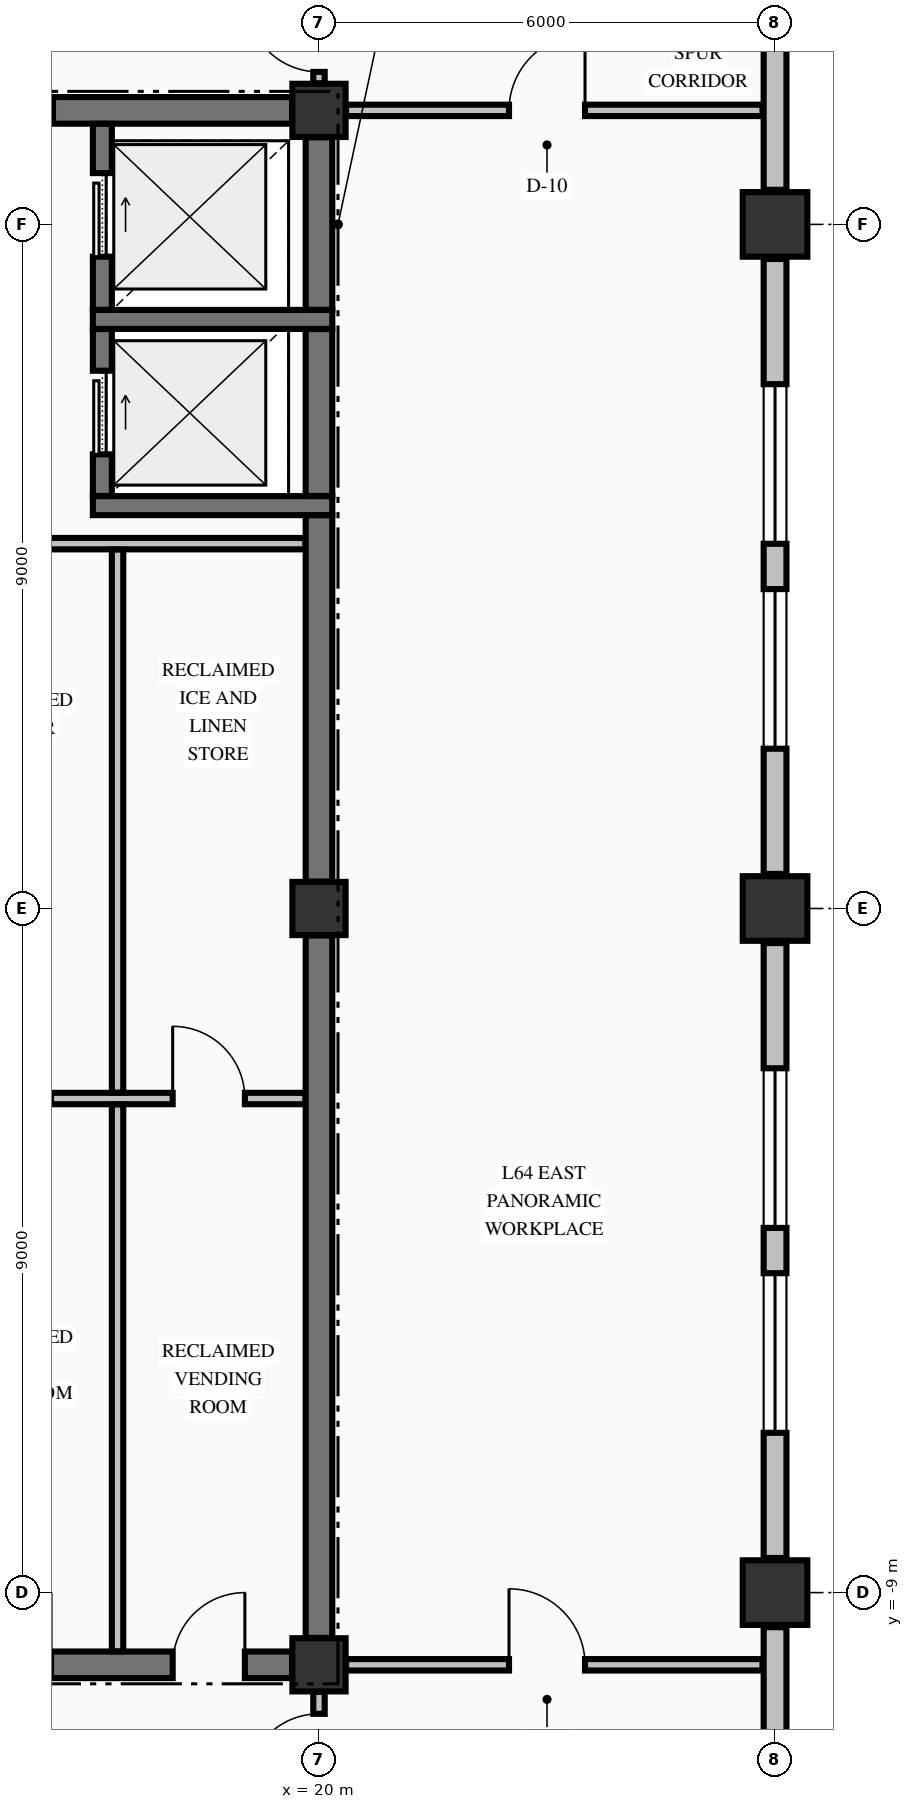
"""IFC4 building model, lengths in metres.
Left out: names, types, materials, properties, quantities, classifications, styles, units other than length and angle.
Written with IfcOpenShell. Run it as: python <this file> out.ifc"""

import sys

from ifc_helpers import new_model, si_unit, direction, frame, frame_2d, origin, origin_2d, place, context, subcontext, project, spatial, rectangle, extrude, element, fill, save


model = new_model("IFC4")
c1 = context("Model", 3, precision=1e-05, world=origin(), true_north=direction((0.0, 1.0)))
c2 = subcontext(c1, "Body", "Model", "MODEL_VIEW")
j1 = project(units=[si_unit("LENGTHUNIT", "METRE"), si_unit("PLANEANGLEUNIT", "RADIAN")], contexts=[c1])
p1 = place(None, origin())
s1 = spatial("IfcSite", under=j1, at=p1, CompositionType="ELEMENT")
p2 = place(p1, origin())
s2 = spatial("IfcBuilding", under=s1, at=p2, CompositionType="ELEMENT")
p3 = place(p2, frame((0.0, 0.0, 242.97)))
s3 = spatial("IfcBuildingStorey", under=s2, at=p3, CompositionType="ELEMENT", Elevation=242.97)
for number, where, z_axis, x_axis in (
    (1, (26.0, -9.0, -0.25), (0.0, 0.0, 1.0), (1.0, 0.0, 0.0)),
    (2, (26.0, 0.0, -0.25), (0.0, 0.0, 1.0), (1.0, 0.0, 0.0)),
    (3, (26.0, 9.0, -0.25), (0.0, 0.0, 1.0), (1.0, 0.0, 0.0)),
):
    element("IfcColumn", number, at=place(p3, frame(where, z_axis=z_axis, x_axis=x_axis)), inside=s3, PredefinedType="COLUMN", context=c2, shape_type="SweptSolid", body=[
        extrude(rectangle(XDim=0.85, YDim=0.85, at=origin_2d()), origin(), (0.0, 0.0, 1.0), 3.23),
    ])
for number, where, z_axis, x_axis in (
    (4, (20.0, -9.95, -0.25), (0.0, 0.0, 1.0), (1.0, 0.0, 0.0)),
    (5, (20.0, 10.5, -0.25), (0.0, 0.0, 1.0), (1.0, 0.0, 0.0)),
    (6, (20.0, 0.0, -0.25), (0.0, 0.0, 1.0), (1.0, 0.0, 0.0)),
):
    element("IfcColumn", number, at=place(p3, frame(where, z_axis=z_axis, x_axis=x_axis)), inside=s3, PredefinedType="COLUMN", context=c2, shape_type="SweptSolid", body=[
        extrude(rectangle(XDim=0.7, YDim=0.7, at=origin_2d()), origin(), (0.0, 0.0, 1.0), 3.23),
    ])
p4 = place(p3, frame((26.0, -17.545, 0.0), z_axis=(0.0, 0.0, 1.0), x_axis=(0.0, 1.0, 0.0)))
e7 = element("IfcWall", 7, at=p4, inside=s3, PredefinedType="STANDARD", context=c2, shape_type="SweptSolid", body=[
    extrude(rectangle(XDim=8.09, YDim=0.3, at=frame_2d((4.045, 0.0))), origin(), (0.0, 0.0, 1.0), 2.372),
])
p5 = place(p3, frame((26.0, -8.545, 0.0), z_axis=(0.0, 0.0, 1.0), x_axis=(0.0, 1.0, 0.0)))
e8 = element("IfcWall", 8, at=p5, inside=s3, PredefinedType="STANDARD", context=c2, shape_type="SweptSolid", body=[
    extrude(rectangle(XDim=8.09, YDim=0.3, at=frame_2d((4.045, 0.0))), origin(), (0.0, 0.0, 1.0), 2.372),
])
p6 = place(p5, frame((1.647, 0.0, 0.7)))
e9 = element("IfcOpeningElement", 9, at=p6, cuts=e8, PredefinedType="OPENING", context=c2, shape_type="SweptSolid", body=[
    extrude(rectangle(XDim=2.1, YDim=1.5, at=frame_2d((1.05, 0.75))), frame((0.0, 0.16, 0.0), z_axis=(0.0, -1.0, 0.0), x_axis=(1.0, 0.0, 0.0)), (0.0, 0.0, 1.0), 0.32),
])
p7 = place(p5, frame((4.343, 0.0, 0.7)))
e10 = element("IfcOpeningElement", 10, at=p7, cuts=e8, PredefinedType="OPENING", context=c2, shape_type="SweptSolid", body=[
    extrude(rectangle(XDim=2.1, YDim=1.5, at=frame_2d((1.05, 0.75))), frame((0.0, 0.16, 0.0), z_axis=(0.0, -1.0, 0.0), x_axis=(1.0, 0.0, 0.0)), (0.0, 0.0, 1.0), 0.32),
])
p8 = place(p3, frame((26.0, 0.455, 0.0), z_axis=(0.0, 0.0, 1.0), x_axis=(0.0, 1.0, 0.0)))
e11 = element("IfcWall", 11, at=p8, inside=s3, PredefinedType="STANDARD", context=c2, shape_type="SweptSolid", body=[
    extrude(rectangle(XDim=8.09, YDim=0.3, at=frame_2d((4.045, 0.0))), origin(), (0.0, 0.0, 1.0), 2.372),
])
p9 = place(p8, frame((1.647, 0.0, 0.7)))
e12 = element("IfcOpeningElement", 12, at=p9, cuts=e11, PredefinedType="OPENING", context=c2, shape_type="SweptSolid", body=[
    extrude(rectangle(XDim=2.1, YDim=1.5, at=frame_2d((1.05, 0.75))), frame((0.0, 0.16, 0.0), z_axis=(0.0, -1.0, 0.0), x_axis=(1.0, 0.0, 0.0)), (0.0, 0.0, 1.0), 0.32),
])
p10 = place(p8, frame((4.343, 0.0, 0.7)))
e13 = element("IfcOpeningElement", 13, at=p10, cuts=e11, PredefinedType="OPENING", context=c2, shape_type="SweptSolid", body=[
    extrude(rectangle(XDim=2.1, YDim=1.5, at=frame_2d((1.05, 0.75))), frame((0.0, 0.16, 0.0), z_axis=(0.0, -1.0, 0.0), x_axis=(1.0, 0.0, 0.0)), (0.0, 0.0, 1.0), 0.32),
])
p11 = place(p3, frame((26.0, 9.455, 0.0), z_axis=(0.0, 0.0, 1.0), x_axis=(0.0, 1.0, 0.0)))
e14 = element("IfcWall", 14, at=p11, inside=s3, PredefinedType="STANDARD", context=c2, shape_type="SweptSolid", body=[
    extrude(rectangle(XDim=8.09, YDim=0.3, at=frame_2d((4.045, 0.0))), origin(), (0.0, 0.0, 1.0), 2.372),
])
p12 = place(p3, frame((14.7, -9.95, 0.0), z_axis=(0.0, 0.0, 1.0), x_axis=(1.0, 0.0, 0.0)))
e15 = element("IfcWall", 15, at=p12, inside=s3, PredefinedType="SHEAR", context=c2, shape_type="SweptSolid", body=[
    extrude(rectangle(XDim=4.946, YDim=0.35, at=frame_2d((2.473, 0.0))), origin(), (0.0, 0.0, 1.0), 2.98),
])
p13 = place(p12, frame((0.825, 0.0, 0.0)))
e16 = element("IfcOpeningElement", 16, at=p13, cuts=e15, PredefinedType="OPENING", context=c2, shape_type="SweptSolid", body=[
    extrude(rectangle(XDim=0.95, YDim=2.15, at=frame_2d((0.475, 1.075))), frame((0.0, 0.185, 0.0), z_axis=(0.0, -1.0, 0.0), x_axis=(1.0, 0.0, 0.0)), (0.0, 0.0, 1.0), 0.37),
])
p14 = place(p12, frame((3.375, 0.0, 0.0)))
e17 = element("IfcOpeningElement", 17, at=p14, cuts=e15, PredefinedType="OPENING", context=c2, shape_type="SweptSolid", body=[
    extrude(rectangle(XDim=0.95, YDim=2.15, at=frame_2d((0.475, 1.075))), frame((0.0, 0.185, 0.0), z_axis=(0.0, -1.0, 0.0), x_axis=(1.0, 0.0, 0.0)), (0.0, 0.0, 1.0), 0.37),
])
for number, where, z_axis, x_axis in (
    (18, (17.025, 5.3, 0.0), (0.0, 0.0, 1.0), (1.0, 0.0, 0.0)),
    (19, (17.025, 7.75, 0.0), (0.0, 0.0, 1.0), (1.0, 0.0, 0.0)),
):
    element("IfcWall", number, at=place(p3, frame(where, z_axis=z_axis, x_axis=x_axis)), inside=s3, PredefinedType="SOLIDWALL", context=c2, shape_type="SweptSolid", body=[
        extrude(rectangle(XDim=3.15, YDim=0.25, at=frame_2d((1.575, 0.0))), origin(), (0.0, 0.0, 1.0), 2.98),
    ])
p15 = place(p3, frame((14.7, 10.5, 0.0), z_axis=(0.0, 0.0, 1.0), x_axis=(1.0, 0.0, 0.0)))
e20 = element("IfcWall", 20, at=p15, inside=s3, PredefinedType="SHEAR", context=c2, shape_type="SweptSolid", body=[
    extrude(rectangle(XDim=4.946, YDim=0.35, at=frame_2d((2.473, 0.0))), origin(), (0.0, 0.0, 1.0), 2.98),
])
p16 = place(p15, frame((0.7, 0.0, 0.0)))
e21 = element("IfcOpeningElement", 21, at=p16, cuts=e20, PredefinedType="OPENING", context=c2, shape_type="SweptSolid", body=[
    extrude(rectangle(XDim=1.1, YDim=2.15, at=frame_2d((0.55, 1.075))), frame((0.0, 0.185, 0.0), z_axis=(0.0, -1.0, 0.0), x_axis=(1.0, 0.0, 0.0)), (0.0, 0.0, 1.0), 0.37),
])
p17 = place(p3, frame((20.356, -9.95, 0.0), z_axis=(0.0, 0.0, 1.0), x_axis=(1.0, 0.0, 0.0)))
e22 = element("IfcWall", 22, at=p17, inside=s3, PredefinedType="PARTITIONING", context=c2, shape_type="SweptSolid", body=[
    extrude(rectangle(XDim=5.479, YDim=0.15, at=frame_2d((2.74, 0.0))), origin(), (0.0, 0.0, 1.0), 2.98),
])
p18 = place(p17, frame((2.144, 0.0, 0.0)))
e23 = element("IfcOpeningElement", 23, at=p18, cuts=e22, PredefinedType="OPENING", context=c2, shape_type="SweptSolid", body=[
    extrude(rectangle(XDim=1.0, YDim=2.15, at=frame_2d((0.5, 1.075))), frame((0.0, 0.085, 0.0), z_axis=(0.0, -1.0, 0.0), x_axis=(1.0, 0.0, 0.0)), (0.0, 0.0, 1.0), 0.17),
])
p19 = place(p3, frame((14.878, -2.5, 0.0), z_axis=(0.0, 0.0, 1.0), x_axis=(1.0, 0.0, 0.0)))
e24 = element("IfcWall", 24, at=p19, inside=s3, PredefinedType="PARTITIONING", context=c2, shape_type="SweptSolid", body=[
    extrude(rectangle(XDim=4.944, YDim=0.15, at=frame_2d((2.472, 0.0))), origin(), (0.0, 0.0, 1.0), 2.98),
])
p20 = place(p19, frame((0.647, 0.0, 0.0)))
e25 = element("IfcOpeningElement", 25, at=p20, cuts=e24, PredefinedType="OPENING", context=c2, shape_type="SweptSolid", body=[
    extrude(rectangle(XDim=0.95, YDim=2.15, at=frame_2d((0.475, 1.075))), frame((0.0, 0.085, 0.0), z_axis=(0.0, -1.0, 0.0), x_axis=(1.0, 0.0, 0.0)), (0.0, 0.0, 1.0), 0.17),
])
p21 = place(p19, frame((3.197, 0.0, 0.0)))
e26 = element("IfcOpeningElement", 26, at=p21, cuts=e24, PredefinedType="OPENING", context=c2, shape_type="SweptSolid", body=[
    extrude(rectangle(XDim=0.95, YDim=2.15, at=frame_2d((0.475, 1.075))), frame((0.0, 0.085, 0.0), z_axis=(0.0, -1.0, 0.0), x_axis=(1.0, 0.0, 0.0)), (0.0, 0.0, 1.0), 0.17),
])
p22 = place(p3, frame((14.878, 4.8, 0.0), z_axis=(0.0, 0.0, 1.0), x_axis=(1.0, 0.0, 0.0)))
e27 = element("IfcWall", 27, at=p22, inside=s3, PredefinedType="PARTITIONING", context=c2, shape_type="SweptSolid", body=[
    extrude(rectangle(XDim=4.944, YDim=0.15, at=frame_2d((2.472, 0.0))), origin(), (0.0, 0.0, 1.0), 2.98),
])
p23 = place(p3, frame((20.356, 10.5, 0.0), z_axis=(0.0, 0.0, 1.0), x_axis=(1.0, 0.0, 0.0)))
e28 = element("IfcWall", 28, at=p23, inside=s3, PredefinedType="PARTITIONING", context=c2, shape_type="SweptSolid", body=[
    extrude(rectangle(XDim=5.479, YDim=0.15, at=frame_2d((2.74, 0.0))), origin(), (0.0, 0.0, 1.0), 2.98),
])
p24 = place(p23, frame((2.144, 0.0, 0.0)))
e29 = element("IfcOpeningElement", 29, at=p24, cuts=e28, PredefinedType="OPENING", context=c2, shape_type="SweptSolid", body=[
    extrude(rectangle(XDim=1.0, YDim=2.15, at=frame_2d((0.5, 1.075))), frame((0.0, 0.085, 0.0), z_axis=(0.0, -1.0, 0.0), x_axis=(1.0, 0.0, 0.0)), (0.0, 0.0, 1.0), 0.17),
])
p25 = place(p3, frame((17.15, 5.427, 0.0), z_axis=(0.0, 0.0, 1.0), x_axis=(0.0, 1.0, 0.0)))
e30 = element("IfcWall", 30, at=p25, inside=s3, PredefinedType="SOLIDWALL", context=c2, shape_type="SweptSolid", body=[
    extrude(rectangle(XDim=2.196, YDim=0.25, at=frame_2d((1.098, 0.0))), origin(), (0.0, 0.0, 1.0), 2.98),
])
p26 = place(p25, frame((0.548, 0.0, 0.0)))
e31 = element("IfcOpeningElement", 31, at=p26, cuts=e30, PredefinedType="OPENING", context=c2, shape_type="SweptSolid", body=[
    extrude(rectangle(XDim=1.1, YDim=2.2, at=frame_2d((0.55, 1.1))), frame((0.0, 0.135, 0.0), z_axis=(0.0, -1.0, 0.0), x_axis=(1.0, 0.0, 0.0)), (0.0, 0.0, 1.0), 0.27),
])
p27 = place(p3, frame((17.15, 7.877, 0.0), z_axis=(0.0, 0.0, 1.0), x_axis=(0.0, 1.0, 0.0)))
e32 = element("IfcWall", 32, at=p27, inside=s3, PredefinedType="SOLIDWALL", context=c2, shape_type="SweptSolid", body=[
    extrude(rectangle(XDim=2.446, YDim=0.25, at=frame_2d((1.223, 0.0))), origin(), (0.0, 0.0, 1.0), 2.98),
])
p28 = place(p27, frame((0.698, 0.0, 0.0)))
e33 = element("IfcOpeningElement", 33, at=p28, cuts=e32, PredefinedType="OPENING", context=c2, shape_type="SweptSolid", body=[
    extrude(rectangle(XDim=1.1, YDim=2.2, at=frame_2d((0.55, 1.1))), frame((0.0, 0.135, 0.0), z_axis=(0.0, -1.0, 0.0), x_axis=(1.0, 0.0, 0.0)), (0.0, 0.0, 1.0), 0.27),
])
p29 = place(p3, frame((20.0, -9.596, 0.0), z_axis=(0.0, 0.0, 1.0), x_axis=(0.0, 1.0, 0.0)))
e34 = element("IfcWall", 34, at=p29, inside=s3, PredefinedType="SHEAR", context=c2, shape_type="SweptSolid", body=[
    extrude(rectangle(XDim=9.242, YDim=0.35, at=frame_2d((4.621, 0.0))), origin(), (0.0, 0.0, 1.0), 2.98),
])
p30 = place(p3, frame((20.0, 0.354, 0.0), z_axis=(0.0, 0.0, 1.0), x_axis=(0.0, 1.0, 0.0)))
e35 = element("IfcWall", 35, at=p30, inside=s3, PredefinedType="SHEAR", context=c2, shape_type="SweptSolid", body=[
    extrude(rectangle(XDim=4.819, YDim=0.35, at=frame_2d((2.41, 0.0))), origin(), (0.0, 0.0, 1.0), 2.98),
])
p31 = place(p3, frame((20.0, 5.427, 0.0), z_axis=(0.0, 0.0, 1.0), x_axis=(0.0, 1.0, 0.0)))
e36 = element("IfcWall", 36, at=p31, inside=s3, PredefinedType="SHEAR", context=c2, shape_type="SweptSolid", body=[
    extrude(rectangle(XDim=2.196, YDim=0.35, at=frame_2d((1.098, 0.0))), origin(), (0.0, 0.0, 1.0), 2.98),
])
p32 = place(p3, frame((20.0, 7.877, 0.0), z_axis=(0.0, 0.0, 1.0), x_axis=(0.0, 1.0, 0.0)))
e37 = element("IfcWall", 37, at=p32, inside=s3, PredefinedType="SHEAR", context=c2, shape_type="SweptSolid", body=[
    extrude(rectangle(XDim=2.269, YDim=0.35, at=frame_2d((1.135, 0.0))), origin(), (0.0, 0.0, 1.0), 2.98),
])
p33 = place(p3, frame((17.35, -9.772, 0.0), z_axis=(0.0, 0.0, 1.0), x_axis=(0.0, 1.0, 0.0)))
e38 = element("IfcWall", 38, at=p33, inside=s3, PredefinedType="PARTITIONING", context=c2, shape_type="SweptSolid", body=[
    extrude(rectangle(XDim=7.194, YDim=0.15, at=frame_2d((3.597, 0.0))), origin(), (0.0, 0.0, 1.0), 2.98),
])
p34 = place(p3, frame((17.35, -2.422, 0.0), z_axis=(0.0, 0.0, 1.0), x_axis=(0.0, 1.0, 0.0)))
e39 = element("IfcWall", 39, at=p34, inside=s3, PredefinedType="PARTITIONING", context=c2, shape_type="SweptSolid", body=[
    extrude(rectangle(XDim=7.144, YDim=0.15, at=frame_2d((3.572, 0.0))), origin(), (0.0, 0.0, 1.0), 2.98),
])
p35 = place(p3, frame((20.0, -12.122, 0.0), z_axis=(0.0, 0.0, 1.0), x_axis=(0.0, 1.0, 0.0)))
e40 = element("IfcWall", 40, at=p35, inside=s3, PredefinedType="PARTITIONING", context=c2, shape_type="SweptSolid", body=[
    extrude(rectangle(XDim=1.816, YDim=0.15, at=frame_2d((0.908, 0.0))), origin(), (0.0, 0.0, 1.0), 2.98),
])
p36 = place(p35, frame((0.577, 0.0, 0.0)))
e41 = element("IfcOpeningElement", 41, at=p36, cuts=e40, PredefinedType="OPENING", context=c2, shape_type="SweptSolid", body=[
    extrude(rectangle(XDim=0.95, YDim=2.15, at=frame_2d((0.475, 1.075))), frame((0.0, 0.085, 0.0), z_axis=(0.0, -1.0, 0.0), x_axis=(1.0, 0.0, 0.0)), (0.0, 0.0, 1.0), 0.17),
])
p37 = place(p3, frame((20.0, 10.856, 0.0), z_axis=(0.0, 0.0, 1.0), x_axis=(0.0, 1.0, 0.0)))
e42 = element("IfcWall", 42, at=p37, inside=s3, PredefinedType="PARTITIONING", context=c2, shape_type="SweptSolid", body=[
    extrude(rectangle(XDim=1.416, YDim=0.15, at=frame_2d((0.708, 0.0))), origin(), (0.0, 0.0, 1.0), 2.98),
])
p38 = place(p37, frame((0.15, 0.0, 0.0)))
e43 = element("IfcOpeningElement", 43, at=p38, cuts=e42, PredefinedType="OPENING", context=c2, shape_type="SweptSolid", body=[
    extrude(rectangle(XDim=0.95, YDim=2.15, at=frame_2d((0.475, 1.075))), frame((0.0, 0.085, 0.0), z_axis=(0.0, -1.0, 0.0), x_axis=(1.0, 0.0, 0.0)), (0.0, 0.0, 1.0), 0.17),
])
p39 = place(p6, origin())
e44 = element("IfcWindow", 44, at=p39, inside=s3, PartitioningType="SINGLE_PANEL", PredefinedType="WINDOW", context=c2, shape_type="SweptSolid", body=[
    extrude(rectangle(XDim=2.1, YDim=1.5, at=frame_2d((1.05, 0.75))), frame((0.0, 0.03, 0.0), z_axis=(0.0, -1.0, 0.0), x_axis=(1.0, 0.0, 0.0)), (0.0, 0.0, 1.0), 0.06),
])
fill(e9, e44)
p40 = place(p7, origin())
e45 = element("IfcWindow", 45, at=p40, inside=s3, PartitioningType="SINGLE_PANEL", PredefinedType="WINDOW", context=c2, shape_type="SweptSolid", body=[
    extrude(rectangle(XDim=2.1, YDim=1.5, at=frame_2d((1.05, 0.75))), frame((0.0, 0.03, 0.0), z_axis=(0.0, -1.0, 0.0), x_axis=(1.0, 0.0, 0.0)), (0.0, 0.0, 1.0), 0.06),
])
fill(e10, e45)
p41 = place(p9, origin())
e46 = element("IfcWindow", 46, at=p41, inside=s3, PartitioningType="SINGLE_PANEL", PredefinedType="WINDOW", context=c2, shape_type="SweptSolid", body=[
    extrude(rectangle(XDim=2.1, YDim=1.5, at=frame_2d((1.05, 0.75))), frame((0.0, 0.03, 0.0), z_axis=(0.0, -1.0, 0.0), x_axis=(1.0, 0.0, 0.0)), (0.0, 0.0, 1.0), 0.06),
])
fill(e12, e46)
p42 = place(p10, origin())
e47 = element("IfcWindow", 47, at=p42, inside=s3, PartitioningType="SINGLE_PANEL", PredefinedType="WINDOW", context=c2, shape_type="SweptSolid", body=[
    extrude(rectangle(XDim=2.1, YDim=1.5, at=frame_2d((1.05, 0.75))), frame((0.0, 0.03, 0.0), z_axis=(0.0, -1.0, 0.0), x_axis=(1.0, 0.0, 0.0)), (0.0, 0.0, 1.0), 0.06),
])
fill(e13, e47)
p43 = place(p26, origin())
e48 = element("IfcDoor", 48, at=p43, inside=s3, OperationType="SLIDING_TO_RIGHT", PredefinedType="DOOR", context=c2, shape_type="SweptSolid", body=[
    extrude(rectangle(XDim=1.1, YDim=2.2, at=frame_2d((0.55, 1.1))), frame((0.0, 0.025, 0.0), z_axis=(0.0, -1.0, 0.0), x_axis=(1.0, 0.0, 0.0)), (0.0, 0.0, 1.0), 0.05),
])
fill(e31, e48)
p44 = place(p28, origin())
e49 = element("IfcDoor", 49, at=p44, inside=s3, OperationType="SLIDING_TO_RIGHT", PredefinedType="DOOR", context=c2, shape_type="SweptSolid", body=[
    extrude(rectangle(XDim=1.1, YDim=2.2, at=frame_2d((0.55, 1.1))), frame((0.0, 0.025, 0.0), z_axis=(0.0, -1.0, 0.0), x_axis=(1.0, 0.0, 0.0)), (0.0, 0.0, 1.0), 0.05),
])
fill(e33, e49)
p45 = place(p16, origin())
e50 = element("IfcDoor", 50, at=p45, inside=s3, OperationType="SINGLE_SWING_LEFT", PredefinedType="DOOR", context=c2, shape_type="SweptSolid", body=[
    extrude(rectangle(XDim=1.1, YDim=2.15, at=frame_2d((0.55, 1.075))), frame((0.0, 0.025, 0.0), z_axis=(0.0, -1.0, 0.0), x_axis=(1.0, 0.0, 0.0)), (0.0, 0.0, 1.0), 0.05),
])
fill(e21, e50)
p46 = place(p14, origin())
e51 = element("IfcDoor", 51, at=p46, inside=s3, OperationType="SINGLE_SWING_RIGHT", PredefinedType="DOOR", context=c2, shape_type="SweptSolid", body=[
    extrude(rectangle(XDim=0.95, YDim=2.15, at=frame_2d((0.475, 1.075))), frame((0.0, 0.025, 0.0), z_axis=(0.0, -1.0, 0.0), x_axis=(1.0, 0.0, 0.0)), (0.0, 0.0, 1.0), 0.05),
])
fill(e17, e51)
p47 = place(p21, origin())
e52 = element("IfcDoor", 52, at=p47, inside=s3, OperationType="SINGLE_SWING_LEFT", PredefinedType="DOOR", context=c2, shape_type="SweptSolid", body=[
    extrude(rectangle(XDim=0.95, YDim=2.15, at=frame_2d((0.475, 1.075))), frame((0.0, 0.025, 0.0), z_axis=(0.0, -1.0, 0.0), x_axis=(1.0, 0.0, 0.0)), (0.0, 0.0, 1.0), 0.05),
])
fill(e26, e52)
p48 = place(p38, origin())
e53 = element("IfcDoor", 53, at=p48, inside=s3, OperationType="SINGLE_SWING_RIGHT", PredefinedType="DOOR", context=c2, shape_type="SweptSolid", body=[
    extrude(rectangle(XDim=0.95, YDim=2.15, at=frame_2d((0.475, 1.075))), frame((0.0, 0.025, 0.0), z_axis=(0.0, -1.0, 0.0), x_axis=(1.0, 0.0, 0.0)), (0.0, 0.0, 1.0), 0.05),
])
fill(e43, e53)
p49 = place(p36, origin())
e54 = element("IfcDoor", 54, at=p49, inside=s3, OperationType="SINGLE_SWING_LEFT", PredefinedType="DOOR", context=c2, shape_type="SweptSolid", body=[
    extrude(rectangle(XDim=0.95, YDim=2.15, at=frame_2d((0.475, 1.075))), frame((0.0, 0.025, 0.0), z_axis=(0.0, -1.0, 0.0), x_axis=(1.0, 0.0, 0.0)), (0.0, 0.0, 1.0), 0.05),
])
fill(e41, e54)
p50 = place(p24, origin())
e55 = element("IfcDoor", 55, at=p50, inside=s3, OperationType="SINGLE_SWING_RIGHT", PredefinedType="DOOR", context=c2, shape_type="SweptSolid", body=[
    extrude(rectangle(XDim=1.0, YDim=2.15, at=frame_2d((0.5, 1.075))), frame((0.0, 0.025, 0.0), z_axis=(0.0, -1.0, 0.0), x_axis=(1.0, 0.0, 0.0)), (0.0, 0.0, 1.0), 0.05),
])
fill(e29, e55)
p51 = place(p18, origin())
e56 = element("IfcDoor", 56, at=p51, inside=s3, OperationType="SINGLE_SWING_LEFT", PredefinedType="DOOR", context=c2, shape_type="SweptSolid", body=[
    extrude(rectangle(XDim=1.0, YDim=2.15, at=frame_2d((0.5, 1.075))), frame((0.0, 0.025, 0.0), z_axis=(0.0, -1.0, 0.0), x_axis=(1.0, 0.0, 0.0)), (0.0, 0.0, 1.0), 0.05),
])
fill(e23, e56)
save(model, sys.argv[1])
